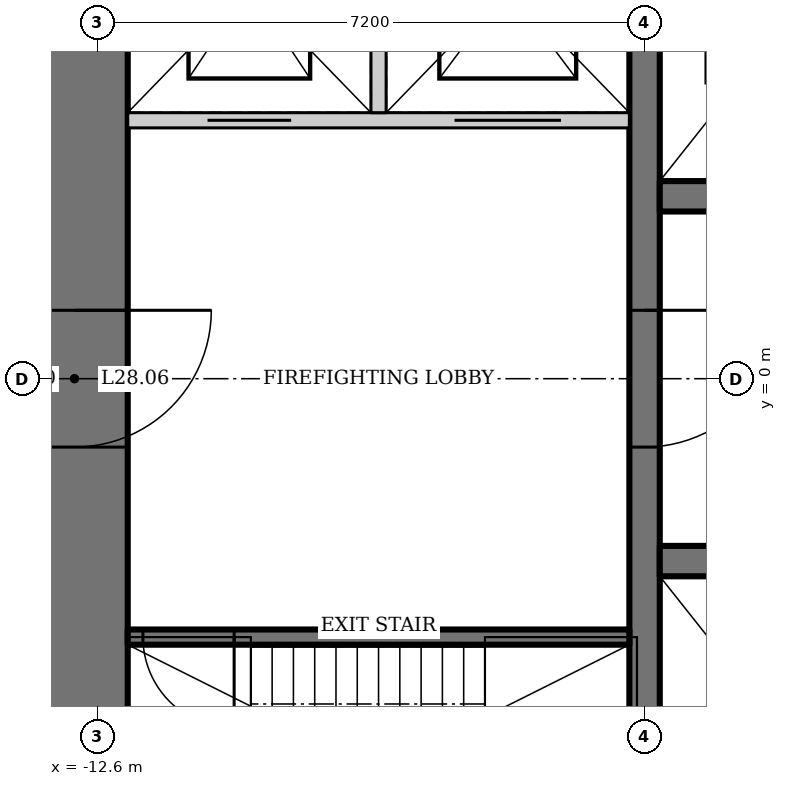
"""IFC4 building model, lengths in metres.
Left out: names, types, materials, properties, quantities, classifications, styles, units other than length and angle.
Written with IfcOpenShell. Run it as: python <this file> out.ifc"""

import sys

from ifc_helpers import new_model, si_unit, direction, frame, frame_2d, origin, place, context, subcontext, project, spatial, rectangle, extrude, element, fill, save


model = new_model("IFC4")
c1 = context("Model", 3, precision=1e-05, world=origin(), true_north=direction((0.0, 1.0)))
c2 = subcontext(c1, "Body", "Model", "MODEL_VIEW")
j1 = project(units=[si_unit("LENGTHUNIT", "METRE"), si_unit("PLANEANGLEUNIT", "RADIAN")], contexts=[c1])
p1 = place(None, origin())
s1 = spatial("IfcSite", under=j1, at=p1, CompositionType="ELEMENT")
p2 = place(p1, origin())
s2 = spatial("IfcBuilding", under=s1, at=p2, CompositionType="ELEMENT")
p3 = place(p2, frame((0.0, 0.0, 121.6)))
s3 = spatial("IfcBuildingStorey", under=s2, at=p3, CompositionType="ELEMENT", Elevation=121.6)
p4 = place(p3, frame((-12.9, 13.0, 0.0), z_axis=(0.0, 0.0, 1.0), x_axis=(0.0, -1.0, 0.0)))
e1 = element("IfcWall", 1, at=p4, inside=s3, PredefinedType="SHEAR", context=c2, shape_type="SweptSolid", body=[
    extrude(rectangle(XDim=26.0, YDim=1.4, at=frame_2d((13.0, 0.0))), origin(), (0.0, 0.0, 1.0), 4.2),
])
p5 = place(p4, frame((12.1, 0.0, 0.0)))
e2 = element("IfcOpeningElement", 2, at=p5, cuts=e1, PredefinedType="OPENING", context=c2, shape_type="SweptSolid", body=[
    extrude(rectangle(XDim=1.8, YDim=2.1, at=frame_2d((0.9, 1.05))), frame((0.0, 0.71, 0.0), z_axis=(0.0, -1.0, 0.0), x_axis=(1.0, 0.0, 0.0)), (0.0, 0.0, 1.0), 1.42),
])
p6 = place(p3, frame((-5.4, 6.8, 0.0), z_axis=(0.0, 0.0, 1.0), x_axis=(0.0, -1.0, 0.0)))
e3 = element("IfcWall", 3, at=p6, inside=s3, PredefinedType="SHEAR", context=c2, shape_type="SweptSolid", body=[
    extrude(rectangle(XDim=13.6, YDim=0.4, at=frame_2d((6.8, 0.0))), origin(), (0.0, 0.0, 1.0), 4.2),
])
p7 = place(p6, frame((5.9, 0.0, 0.0)))
e4 = element("IfcOpeningElement", 4, at=p7, cuts=e3, PredefinedType="OPENING", context=c2, shape_type="SweptSolid", body=[
    extrude(rectangle(XDim=1.8, YDim=2.1, at=frame_2d((0.9, 1.05))), frame((0.0, 0.21, 0.0), z_axis=(0.0, -1.0, 0.0), x_axis=(1.0, 0.0, 0.0)), (0.0, 0.0, 1.0), 0.42),
])
p8 = place(p3, frame((-5.2, -2.4, 0.0), z_axis=(0.0, 0.0, 1.0), x_axis=(1.0, 0.0, 0.0)))
e5 = element("IfcWall", 5, at=p8, inside=s3, PredefinedType="SHEAR", context=c2, shape_type="SweptSolid", body=[
    extrude(rectangle(XDim=10.4, YDim=0.4, at=frame_2d((5.2, 0.0))), origin(), (0.0, 0.0, 1.0), 4.2),
])
p9 = place(p3, frame((5.2, 2.4, 0.0), z_axis=(0.0, 0.0, 1.0), x_axis=(-1.0, 0.0, 0.0)))
e6 = element("IfcWall", 6, at=p9, inside=s3, PredefinedType="SHEAR", context=c2, shape_type="SweptSolid", body=[
    extrude(rectangle(XDim=10.4, YDim=0.4, at=frame_2d((5.2, 0.0))), origin(), (0.0, 0.0, 1.0), 4.2),
])
p10 = place(p9, frame((8.183, 0.0, 0.0)))
e7 = element("IfcOpeningElement", 7, at=p10, cuts=e6, PredefinedType="OPENING", context=c2, shape_type="SweptSolid", body=[
    extrude(rectangle(XDim=1.1, YDim=2.2, at=frame_2d((0.55, 1.1))), frame((0.0, 0.21, 0.0), z_axis=(0.0, -1.0, 0.0), x_axis=(1.0, 0.0, 0.0)), (0.0, 0.0, 1.0), 0.42),
])
p11 = place(p9, frame((4.65, 0.0, 0.0)))
e8 = element("IfcOpeningElement", 8, at=p11, cuts=e6, PredefinedType="OPENING", context=c2, shape_type="SweptSolid", body=[
    extrude(rectangle(XDim=1.1, YDim=2.2, at=frame_2d((0.55, 1.1))), frame((0.0, 0.21, 0.0), z_axis=(0.0, -1.0, 0.0), x_axis=(1.0, 0.0, 0.0)), (0.0, 0.0, 1.0), 0.42),
])
p12 = place(p9, frame((1.117, 0.0, 0.0)))
e9 = element("IfcOpeningElement", 9, at=p12, cuts=e6, PredefinedType="OPENING", context=c2, shape_type="SweptSolid", body=[
    extrude(rectangle(XDim=1.1, YDim=2.2, at=frame_2d((0.55, 1.1))), frame((0.0, 0.21, 0.0), z_axis=(0.0, -1.0, 0.0), x_axis=(1.0, 0.0, 0.0)), (0.0, 0.0, 1.0), 0.42),
])
p13 = place(p3, frame((-5.6, -3.4, 0.0), z_axis=(0.0, 0.0, 1.0), x_axis=(-1.0, 0.0, 0.0)))
e10 = element("IfcWall", 10, at=p13, inside=s3, PredefinedType="SHEAR", context=c2, shape_type="SweptSolid", body=[
    extrude(rectangle(XDim=6.6, YDim=0.2, at=frame_2d((3.3, 0.0))), origin(), (0.0, 0.0, 1.0), 4.2),
])
p14 = place(p13, frame((5.2, 0.0, 0.0)))
e11 = element("IfcOpeningElement", 11, at=p14, cuts=e10, PredefinedType="OPENING", context=c2, shape_type="SweptSolid", body=[
    extrude(rectangle(XDim=1.2, YDim=2.1, at=frame_2d((0.6, 1.05))), frame((0.0, 0.11, 0.0), z_axis=(0.0, -1.0, 0.0), x_axis=(1.0, 0.0, 0.0)), (0.0, 0.0, 1.0), 0.22),
])
p15 = place(p3, frame((-12.2, 3.4, 0.0), z_axis=(0.0, 0.0, 1.0), x_axis=(1.0, 0.0, 0.0)))
e12 = element("IfcWall", 12, at=p15, inside=s3, PredefinedType="SOLIDWALL", context=c2, shape_type="SweptSolid", body=[
    extrude(rectangle(XDim=6.6, YDim=0.2, at=frame_2d((3.3, 0.0))), origin(), (0.0, 0.0, 1.0), 4.2),
])
p16 = place(p15, frame((1.05, 0.0, 0.0)))
e13 = element("IfcOpeningElement", 13, at=p16, cuts=e12, PredefinedType="OPENING", context=c2, shape_type="SweptSolid", body=[
    extrude(rectangle(XDim=1.1, YDim=2.2, at=frame_2d((0.55, 1.1))), frame((0.0, 0.11, 0.0), z_axis=(0.0, -1.0, 0.0), x_axis=(1.0, 0.0, 0.0)), (0.0, 0.0, 1.0), 0.22),
])
p17 = place(p15, frame((4.3, 0.0, 0.0)))
e14 = element("IfcOpeningElement", 14, at=p17, cuts=e12, PredefinedType="OPENING", context=c2, shape_type="SweptSolid", body=[
    extrude(rectangle(XDim=1.4, YDim=2.2, at=frame_2d((0.7, 1.1))), frame((0.0, 0.11, 0.0), z_axis=(0.0, -1.0, 0.0), x_axis=(1.0, 0.0, 0.0)), (0.0, 0.0, 1.0), 0.22),
])
p18 = place(p3, frame((-8.9, 3.5, 0.0), z_axis=(0.0, 0.0, 1.0), x_axis=(0.0, 1.0, 0.0)))
e15 = element("IfcWall", 15, at=p18, inside=s3, PredefinedType="SOLIDWALL", context=c2, shape_type="SweptSolid", body=[
    extrude(rectangle(XDim=3.3, YDim=0.2, at=frame_2d((1.65, 0.0))), origin(), (0.0, 0.0, 1.0), 4.2),
])
p19 = place(p7, origin())
e16 = element("IfcDoor", 16, at=p19, inside=s3, OperationType="DOUBLE_DOOR_DOUBLE_SWING", PredefinedType="DOOR", context=c2, shape_type="SweptSolid", body=[
    extrude(rectangle(XDim=1.8, YDim=2.1, at=frame_2d((0.9, 1.05))), frame((0.0, 0.025, 0.0), z_axis=(0.0, -1.0, 0.0), x_axis=(1.0, 0.0, 0.0)), (0.0, 0.0, 1.0), 0.05),
])
fill(e4, e16)
p20 = place(p14, origin())
e17 = element("IfcDoor", 17, at=p20, inside=s3, OperationType="SINGLE_SWING_RIGHT", PredefinedType="DOOR", context=c2, shape_type="SweptSolid", body=[
    extrude(rectangle(XDim=1.2, YDim=2.1, at=frame_2d((0.6, 1.05))), frame((0.0, 0.025, 0.0), z_axis=(0.0, -1.0, 0.0), x_axis=(1.0, 0.0, 0.0)), (0.0, 0.0, 1.0), 0.05),
])
fill(e11, e17)
p21 = place(p5, origin())
e18 = element("IfcDoor", 18, at=p21, inside=s3, OperationType="DOUBLE_DOOR_DOUBLE_SWING", PredefinedType="DOOR", context=c2, shape_type="SweptSolid", body=[
    extrude(rectangle(XDim=1.8, YDim=2.1, at=frame_2d((0.9, 1.05))), frame((0.0, 0.025, 0.0), z_axis=(0.0, -1.0, 0.0), x_axis=(1.0, 0.0, 0.0)), (0.0, 0.0, 1.0), 0.05),
])
fill(e2, e18)
p22 = place(p16, origin())
e19 = element("IfcDoor", 19, at=p22, inside=s3, OperationType="DOUBLE_DOOR_SLIDING", PredefinedType="DOOR", context=c2, shape_type="SweptSolid", body=[
    extrude(rectangle(XDim=1.1, YDim=2.2, at=frame_2d((0.55, 1.1))), frame((0.0, 0.025, 0.0), z_axis=(0.0, -1.0, 0.0), x_axis=(1.0, 0.0, 0.0)), (0.0, 0.0, 1.0), 0.05),
])
fill(e13, e19)
p23 = place(p17, origin())
e20 = element("IfcDoor", 20, at=p23, inside=s3, OperationType="DOUBLE_DOOR_SLIDING", PredefinedType="DOOR", context=c2, shape_type="SweptSolid", body=[
    extrude(rectangle(XDim=1.4, YDim=2.2, at=frame_2d((0.7, 1.1))), frame((0.0, 0.025, 0.0), z_axis=(0.0, -1.0, 0.0), x_axis=(1.0, 0.0, 0.0)), (0.0, 0.0, 1.0), 0.05),
])
fill(e14, e20)
save(model, sys.argv[1])
